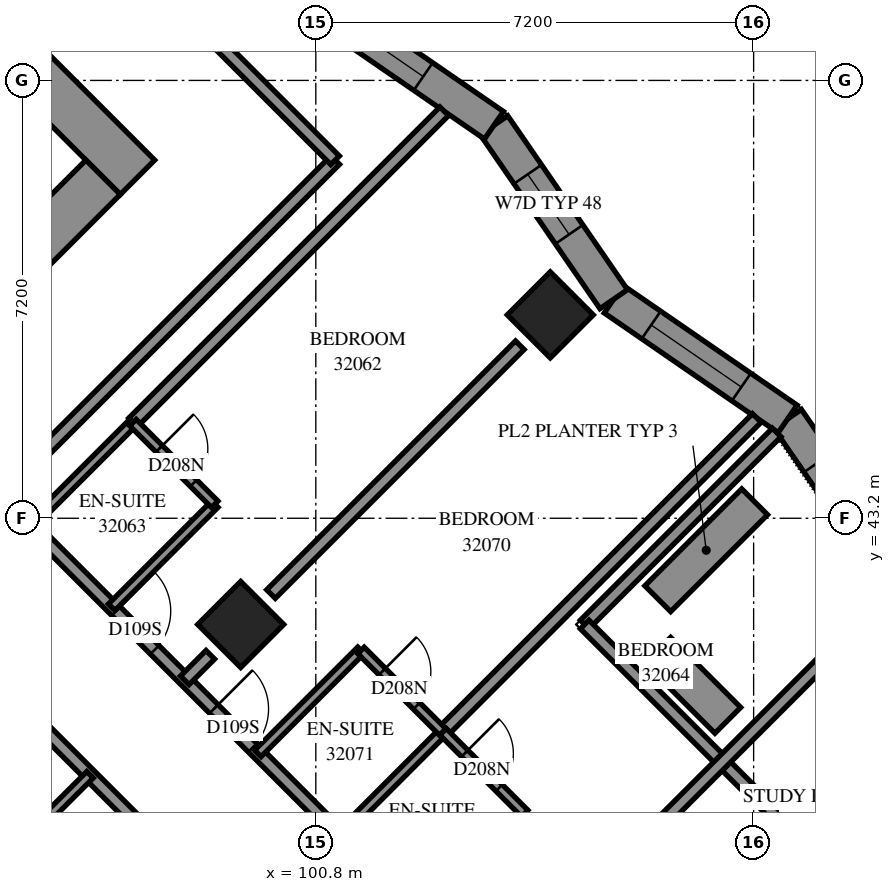
"""IFC4 building model, lengths in metres.
Left out: names, types, materials, properties, quantities, classifications, styles, units other than length and angle.
Written with IfcOpenShell. Run it as: python <this file> out.ifc"""

import sys

from ifc_helpers import new_model, si_unit, direction, frame, frame_2d, origin, origin_2d, place, context, subcontext, project, spatial, polyline, rectangle, outline, extrude, element, fill, save


model = new_model("IFC4")
c1 = context("Model", 3, precision=1e-05, world=origin(), true_north=direction((0.0, 1.0)))
c2 = subcontext(c1, "Body", "Model", "MODEL_VIEW")
j1 = project(units=[si_unit("LENGTHUNIT", "METRE"), si_unit("PLANEANGLEUNIT", "RADIAN")], contexts=[c1])
p1 = place(None, origin())
s1 = spatial("IfcSite", under=j1, at=p1, CompositionType="ELEMENT")
p2 = place(p1, origin())
s2 = spatial("IfcBuilding", under=s1, at=p2, CompositionType="ELEMENT")
p3 = place(p2, frame((0.0, 0.0, 118.6)))
s3 = spatial("IfcBuildingStorey", under=s2, at=p3, CompositionType="ELEMENT", Elevation=118.6)
for number, where, z_axis, x_axis in (
    (1, (104.656, 46.544, 0.0), (0.0, 0.0, 1.0), (0.707, -0.707, 0.0)),
    (2, (99.565, 41.453, 0.0), (0.0, 0.0, 1.0), (0.707, -0.707, 0.0)),
):
    element("IfcColumn", number, at=place(p3, frame(where, z_axis=z_axis, x_axis=x_axis)), inside=s3, PredefinedType="COLUMN", context=c2, shape_type="SweptSolid", body=[
        extrude(rectangle(XDim=1.0, YDim=1.0, at=origin_2d()), origin(), (0.0, 0.0, 1.0), 3.1),
    ])
p4 = place(p3, frame((86.554, 60.121, -0.3), z_axis=(0.0, 0.0, 1.0), x_axis=(0.7071067812, -0.7071067812, 0.0)))
e3 = element("IfcWall", 3, at=p4, inside=s3, PredefinedType="SHEAR", context=c2, shape_type="SweptSolid", body=[
    extrude(rectangle(XDim=16.0, YDim=0.8, at=frame_2d((8.0, 0.0))), origin(), (0.0, 0.0, 1.0), 2.7),
])
p5 = place(p4, frame((10.8, 0.0, 0.3)))
e4 = element("IfcOpeningElement", 4, at=p5, cuts=e3, PredefinedType="OPENING", context=c2, shape_type="SweptSolid", body=[
    extrude(rectangle(XDim=0.8, YDim=2.1, at=frame_2d((0.4, 1.05))), frame((0.0, 0.41, 0.0), z_axis=(0.0, -1.0, 0.0), x_axis=(1.0, 0.0, 0.0)), (0.0, 0.0, 1.0), 0.82),
])
p6 = place(p3, frame((87.12, 38.625, -0.3), z_axis=(0.0, 0.0, 1.0), x_axis=(0.7071067812, 0.7071067812, 0.0)))
e5 = element("IfcWall", 5, at=p6, inside=s3, PredefinedType="SHEAR", context=c2, shape_type="SweptSolid", body=[
    extrude(rectangle(XDim=14.4, YDim=0.8, at=frame_2d((7.2, 0.0))), origin(), (0.0, 0.0, 1.0), 2.7),
])
p7 = place(p6, frame((4.55, 0.0, 0.3)))
e6 = element("IfcOpeningElement", 6, at=p7, cuts=e5, PredefinedType="OPENING", context=c2, shape_type="SweptSolid", body=[
    extrude(rectangle(XDim=1.1, YDim=2.1, at=frame_2d((0.55, 1.05))), frame((0.0, 0.41, 0.0), z_axis=(0.0, -1.0, 0.0), x_axis=(1.0, 0.0, 0.0)), (0.0, 0.0, 1.0), 0.82),
])
p8 = place(p6, frame((11.35, 0.0, 0.3)))
e7 = element("IfcOpeningElement", 7, at=p8, cuts=e5, PredefinedType="OPENING", context=c2, shape_type="SweptSolid", body=[
    extrude(rectangle(XDim=1.1, YDim=2.1, at=frame_2d((0.55, 1.05))), frame((0.0, 0.41, 0.0), z_axis=(0.0, -1.0, 0.0), x_axis=(1.0, 0.0, 0.0)), (0.0, 0.0, 1.0), 0.82),
])
p9 = place(p3, frame((109.358, 36.362, 0.0), z_axis=(0.0, 0.0, 1.0), x_axis=(0.7071067812, 0.7071067812, 0.0)))
e8 = element("IfcWall", 8, at=p9, inside=s3, PredefinedType="SOLIDWALL", context=c2, shape_type="SweptSolid", body=[
    extrude(outline(polyline([(0.275, -0.275), (6.305, -0.275), (5.522, 0.275), (-0.275, 0.275), (0.275, -0.275)])), origin(), (0.0, 0.0, 1.0), 3.1),
])
p10 = place(p9, frame((1.137, 0.0, 0.7)))
e9 = element("IfcOpeningElement", 9, at=p10, cuts=e8, PredefinedType="OPENING", context=c2, shape_type="SweptSolid", body=[
    extrude(rectangle(XDim=1.8, YDim=1.8, at=frame_2d((0.9, 0.9))), frame((0.0, 0.285, 0.0), z_axis=(0.0, -1.0, 0.0), x_axis=(1.0, 0.0, 0.0)), (0.0, 0.0, 1.0), 0.57),
])
p11 = place(p3, frame((110.542, 41.953, 0.0), z_axis=(0.0, 0.0, 1.0), x_axis=(-0.5670991884, 0.8236495071, 0.0)))
e10 = element("IfcWall", 10, at=p11, inside=s3, PredefinedType="SOLIDWALL", context=c2, shape_type="SweptSolid", body=[
    extrude(outline(polyline([(0.074, -0.275), (3.547, -0.275), (3.446, 0.275), (-0.074, 0.275), (0.074, -0.275)])), origin(), (0.0, 0.0, 1.0), 3.1),
])
p12 = place(p11, frame((0.823, 0.0, 0.7)))
e11 = element("IfcOpeningElement", 11, at=p12, cuts=e10, PredefinedType="OPENING", context=c2, shape_type="SweptSolid", body=[
    extrude(rectangle(XDim=1.8, YDim=2.0, at=frame_2d((0.9, 1.0))), frame((0.0, 0.285, 0.0), z_axis=(0.0, -1.0, 0.0), x_axis=(1.0, 0.0, 0.0)), (0.0, 0.0, 1.0), 0.57),
])
p13 = place(p3, frame((108.559, 44.833, 0.0), z_axis=(0.0, 0.0, 1.0), x_axis=(-0.8236501806, 0.5670982102, 0.0)))
e12 = element("IfcWall", 12, at=p13, inside=s3, PredefinedType="SOLIDWALL", context=c2, shape_type="SweptSolid", body=[
    extrude(outline(polyline([(-0.051, -0.275), (3.422, -0.275), (3.523, 0.275), (0.051, 0.275), (-0.051, -0.275)])), origin(), (0.0, 0.0, 1.0), 3.1),
])
p14 = place(p13, frame((0.924, 0.0, 0.7)))
e13 = element("IfcOpeningElement", 13, at=p14, cuts=e12, PredefinedType="OPENING", context=c2, shape_type="SweptSolid", body=[
    extrude(rectangle(XDim=1.8, YDim=2.0, at=frame_2d((0.9, 1.0))), frame((0.0, 0.285, 0.0), z_axis=(0.0, -1.0, 0.0), x_axis=(1.0, 0.0, 0.0)), (0.0, 0.0, 1.0), 0.57),
])
p15 = place(p3, frame((105.699, 46.803, 0.0), z_axis=(0.0, 0.0, 1.0), x_axis=(-0.567104295, 0.8236459911, 0.0)))
e14 = element("IfcWall", 14, at=p15, inside=s3, PredefinedType="SOLIDWALL", context=c2, shape_type="SweptSolid", body=[
    extrude(outline(polyline([(0.051, -0.275), (3.523, -0.275), (3.422, 0.275), (-0.051, 0.275), (0.051, -0.275)])), origin(), (0.0, 0.0, 1.0), 3.1),
])
p16 = place(p15, frame((1.293, 0.0, 0.5)))
e15 = element("IfcOpeningElement", 15, at=p16, cuts=e14, PredefinedType="OPENING", context=c2, shape_type="SweptSolid", body=[
    extrude(rectangle(XDim=1.2, YDim=2.45, at=frame_2d((0.6, 1.225))), frame((0.0, 0.285, 0.0), z_axis=(0.0, -1.0, 0.0), x_axis=(1.0, 0.0, 0.0)), (0.0, 0.0, 1.0), 0.57),
])
p17 = place(p3, frame((103.73, 49.663, 0.0), z_axis=(0.0, 0.0, 1.0), x_axis=(-0.8236594414, 0.5670847596, 0.0)))
e16 = element("IfcWall", 16, at=p17, inside=s3, PredefinedType="SOLIDWALL", context=c2, shape_type="SweptSolid", body=[
    extrude(outline(polyline([(-0.051, -0.275), (3.422, -0.275), (3.523, 0.275), (0.051, 0.275), (-0.051, -0.275)])), origin(), (0.0, 0.0, 1.0), 3.1),
])
p18 = place(p17, frame((1.413, 0.0, 0.5)))
e17 = element("IfcOpeningElement", 17, at=p18, cuts=e16, PredefinedType="OPENING", context=c2, shape_type="SweptSolid", body=[
    extrude(rectangle(XDim=1.2, YDim=2.45, at=frame_2d((0.6, 1.225))), frame((0.0, 0.285, 0.0), z_axis=(0.0, -1.0, 0.0), x_axis=(1.0, 0.0, 0.0)), (0.0, 0.0, 1.0), 0.57),
])
p19 = place(p3, frame((108.379, 44.61, 0.0), z_axis=(0.0, 0.0, 1.0), x_axis=(-0.7071179789, -0.7070955833, 0.0)))
e18 = element("IfcWall", 18, at=p19, inside=s3, PredefinedType="PARAPET", context=c2, shape_type="SweptSolid", body=[
    extrude(outline(polyline([(0.0, -0.1), (4.565, -0.1), (4.365, 0.1), (0.0, 0.1), (0.0, -0.1)])), origin(), (0.0, 0.0, 1.0), 0.25),
])
p20 = place(p3, frame((105.222, 41.453, 0.0), z_axis=(0.0, 0.0, 1.0), x_axis=(0.7071067812, -0.7071067812, 0.0)))
e19 = element("IfcWall", 19, at=p20, inside=s3, PredefinedType="PARAPET", context=c2, shape_type="SweptSolid", body=[
    extrude(outline(polyline([(-0.1, -0.1), (4.59, -0.1), (4.718, 0.1), (0.1, 0.1), (-0.1, -0.1)])), origin(), (0.0, 0.0, 1.0), 0.25),
])
p21 = place(p3, frame((106.424, 41.029, 0.0), z_axis=(0.0, 0.0, 1.0), x_axis=(0.7071374776, -0.7070760835, 0.0)))
e20 = element("IfcWall", 20, at=p21, inside=s3, PredefinedType="SOLIDWALL", context=c2, shape_type="SweptSolid", body=[
    extrude(rectangle(XDim=1.629, YDim=0.6, at=frame_2d((0.814, 0.0))), origin(), (0.0, 0.0, 1.0), 0.65),
])
p22 = place(p3, frame((94.047, 42.015, 0.0), z_axis=(0.0, 0.0, 1.0), x_axis=(0.7071067812, -0.7071067812, 0.0)))
e21 = element("IfcWall", 21, at=p22, inside=s3, PredefinedType="PARTITIONING", context=c2, shape_type="SweptSolid", body=[
    extrude(rectangle(XDim=9.6, YDim=0.2, at=frame_2d((4.8, 0.0))), origin(), (0.0, 0.0, 1.0), 3.1),
])
p23 = place(p22, frame((1.099, 0.0, 0.0)))
e22 = element("IfcOpeningElement", 22, at=p23, cuts=e21, PredefinedType="OPENING", context=c2, shape_type="SweptSolid", body=[
    extrude(rectangle(XDim=0.9, YDim=2.1, at=frame_2d((0.45, 1.05))), frame((0.0, 0.11, 0.0), z_axis=(0.0, -1.0, 0.0), x_axis=(1.0, 0.0, 0.0)), (0.0, 0.0, 1.0), 0.22),
])
p24 = place(p22, frame((6.649, 0.0, 0.0)))
e23 = element("IfcOpeningElement", 23, at=p24, cuts=e21, PredefinedType="OPENING", context=c2, shape_type="SweptSolid", body=[
    extrude(rectangle(XDim=0.9, YDim=2.1, at=frame_2d((0.45, 1.05))), frame((0.0, 0.11, 0.0), z_axis=(0.0, -1.0, 0.0), x_axis=(1.0, 0.0, 0.0)), (0.0, 0.0, 1.0), 0.22),
])
p25 = place(p22, frame((8.3, 0.0, 0.0)))
e24 = element("IfcOpeningElement", 24, at=p25, cuts=e21, PredefinedType="OPENING", context=c2, shape_type="SweptSolid", body=[
    extrude(rectangle(XDim=0.9, YDim=2.1, at=frame_2d((0.45, 1.05))), frame((0.0, 0.11, 0.0), z_axis=(0.0, -1.0, 0.0), x_axis=(1.0, 0.0, 0.0)), (0.0, 0.0, 1.0), 0.22),
])
p26 = place(p3, frame((96.103, 43.083, 0.0), z_axis=(0.0, 0.0, 1.0), x_axis=(0.7071067812, -0.7071067812, 0.0)))
e25 = element("IfcWall", 25, at=p26, inside=s3, PredefinedType="PARTITIONING", context=c2, shape_type="SweptSolid", body=[
    extrude(rectangle(XDim=8.491, YDim=0.2, at=frame_2d((4.245, 0.0))), origin(), (0.0, 0.0, 1.0), 3.1),
])
p27 = place(p26, frame((1.995, 0.0, 0.0)))
e26 = element("IfcOpeningElement", 26, at=p27, cuts=e25, PredefinedType="OPENING", context=c2, shape_type="SweptSolid", body=[
    extrude(rectangle(XDim=0.9, YDim=2.1, at=frame_2d((0.45, 1.05))), frame((0.0, 0.11, 0.0), z_axis=(0.0, -1.0, 0.0), x_axis=(1.0, 0.0, 0.0)), (0.0, 0.0, 1.0), 0.22),
])
p28 = place(p26, frame((4.27, 0.0, 0.0)))
e27 = element("IfcOpeningElement", 27, at=p28, cuts=e25, PredefinedType="OPENING", context=c2, shape_type="SweptSolid", body=[
    extrude(rectangle(XDim=0.9, YDim=2.1, at=frame_2d((0.45, 1.05))), frame((0.0, 0.11, 0.0), z_axis=(0.0, -1.0, 0.0), x_axis=(1.0, 0.0, 0.0)), (0.0, 0.0, 1.0), 0.22),
])
p29 = place(p3, frame((95.606, 43.577, 0.0), z_axis=(0.0, 0.0, 1.0), x_axis=(0.7071067812, 0.7071067812, 0.0)))
e28 = element("IfcWall", 28, at=p29, inside=s3, PredefinedType="PARTITIONING", context=c2, shape_type="SweptSolid", body=[
    extrude(rectangle(XDim=7.798, YDim=0.2, at=frame_2d((3.899, 0.0))), origin(), (0.0, 0.0, 1.0), 3.1),
])
p30 = place(p3, frame((102.887, 39.687, 0.0), z_axis=(0.0, 0.0, 1.0), x_axis=(0.707250564, 0.7069629691, 0.0)))
e29 = element("IfcWall", 29, at=p30, inside=s3, PredefinedType="PARTITIONING", context=c2, shape_type="SweptSolid", body=[
    extrude(rectangle(XDim=7.302, YDim=0.2, at=frame_2d((3.651, 0.0))), origin(), (0.0, 0.0, 1.0), 3.1),
])
p31 = place(p3, frame((97.795, 44.777, 0.0), z_axis=(0.0, 0.0, 1.0), x_axis=(0.7071136921, 0.7070998702, 0.0)))
e30 = element("IfcWall", 30, at=p31, inside=s3, PredefinedType="PARTITIONING", context=c2, shape_type="SweptSolid", body=[
    extrude(rectangle(XDim=7.235, YDim=0.2, at=frame_2d((3.617, 0.0))), origin(), (0.0, 0.0, 1.0), 3.1),
])
for number, where, z_axis, x_axis in (
    (31, (105.155, 36.863, 0.0), (0.0, 0.0, 1.0), (0.707, 0.707, 0.0)),
    (32, (100.063, 41.953, 0.0), (0.0, 0.0, 1.0), (0.707, 0.707, 0.0)),
):
    element("IfcWall", number, at=place(p3, frame(where, z_axis=z_axis, x_axis=x_axis)), inside=s3, PredefinedType="PARTITIONING", context=c2, shape_type="SweptSolid", body=[
        extrude(rectangle(XDim=5.787, YDim=0.2, at=frame_2d((2.893, 0.0))), origin(), (0.0, 0.0, 1.0), 3.1),
    ])
p32 = place(p3, frame((94.047, 38.621, 0.0), z_axis=(0.0, 0.0, 1.0), x_axis=(0.7071067812, -0.7071067812, 0.0)))
e33 = element("IfcWall", 33, at=p32, inside=s3, PredefinedType="PARTITIONING", context=c2, shape_type="SweptSolid", body=[
    extrude(rectangle(XDim=3.799, YDim=0.15, at=frame_2d((1.899, 0.0))), origin(), (0.0, 0.0, 1.0), 3.1),
])
p33 = place(p32, frame((0.444, 0.0, 0.0)))
e34 = element("IfcOpeningElement", 34, at=p33, cuts=e33, PredefinedType="OPENING", context=c2, shape_type="SweptSolid", body=[
    extrude(rectangle(XDim=0.8, YDim=2.1, at=frame_2d((0.4, 1.05))), frame((0.0, 0.085, 0.0), z_axis=(0.0, -1.0, 0.0), x_axis=(1.0, 0.0, 0.0)), (0.0, 0.0, 1.0), 0.17),
])
p34 = place(p32, frame((2.551, 0.0, 0.0)))
e35 = element("IfcOpeningElement", 35, at=p34, cuts=e33, PredefinedType="OPENING", context=c2, shape_type="SweptSolid", body=[
    extrude(rectangle(XDim=0.8, YDim=2.1, at=frame_2d((0.4, 1.05))), frame((0.0, 0.085, 0.0), z_axis=(0.0, -1.0, 0.0), x_axis=(1.0, 0.0, 0.0)), (0.0, 0.0, 1.0), 0.17),
])
p35 = place(p3, frame((99.071, 51.133, 0.0), z_axis=(0.0, 0.0, 1.0), x_axis=(0.7071067812, -0.7071067812, 0.0)))
e36 = element("IfcWall", 36, at=p35, inside=s3, PredefinedType="PARTITIONING", context=c2, shape_type="SweptSolid", body=[
    extrude(rectangle(XDim=2.893, YDim=0.2, at=frame_2d((1.447, 0.0))), origin(), (0.0, 0.0, 1.0), 3.1),
])
p36 = place(p3, frame((102.533, 36.645, 0.0), z_axis=(0.0, 0.0, 1.0), x_axis=(0.7071067812, 0.7071067812, 0.0)))
e37 = element("IfcWall", 37, at=p36, inside=s3, PredefinedType="PARTITIONING", context=c2, shape_type="SweptSolid", body=[
    extrude(rectangle(XDim=2.401, YDim=0.15, at=frame_2d((1.201, 0.0))), origin(), (0.0, 0.0, 1.0), 3.1),
])
for number, where, z_axis, x_axis in (
    (38, (101.192, 37.988, 0.0), (0.0, 0.0, 1.0), (0.707, 0.708, 0.0)),
    (39, (95.389, 37.285, 0.0), (0.0, 0.0, 1.0), (0.708, 0.707, 0.0)),
):
    element("IfcWall", number, at=place(p3, frame(where, z_axis=z_axis, x_axis=x_axis)), inside=s3, PredefinedType="PARTITIONING", context=c2, shape_type="SweptSolid", body=[
        extrude(rectangle(XDim=2.4, YDim=0.15, at=frame_2d((1.2, 0.0))), origin(), (0.0, 0.0, 1.0), 3.1),
    ])
for number, where, z_axis, x_axis in (
    (40, (97.443, 41.737, 0.0), (0.0, 0.0, 1.0), (0.707, 0.707, 0.0)),
    (41, (96.099, 43.081, 0.0), (0.0, 0.0, 1.0), (0.707, 0.707, 0.0)),
    (42, (99.847, 39.333, 0.0), (0.0, 0.0, 1.0), (0.707, 0.707, 0.0)),
):
    element("IfcWall", number, at=place(p3, frame(where, z_axis=z_axis, x_axis=x_axis)), inside=s3, PredefinedType="PARTITIONING", context=c2, shape_type="SweptSolid", body=[
        extrude(rectangle(XDim=2.398, YDim=0.15, at=frame_2d((1.199, 0.0))), origin(), (0.0, 0.0, 1.0), 3.1),
    ])
p37 = place(p3, frame((97.793, 44.773, 0.0), z_axis=(0.0, 0.0, 1.0), x_axis=(0.7071067812, -0.7071067812, 0.0)))
e43 = element("IfcWall", 43, at=p37, inside=s3, PredefinedType="PARTITIONING", context=c2, shape_type="SweptSolid", body=[
    extrude(rectangle(XDim=1.901, YDim=0.15, at=frame_2d((0.95, 0.0))), origin(), (0.0, 0.0, 1.0), 3.1),
])
p38 = place(p37, frame((0.609, 0.0, 0.0)))
e44 = element("IfcOpeningElement", 44, at=p38, cuts=e43, PredefinedType="OPENING", context=c2, shape_type="SweptSolid", body=[
    extrude(rectangle(XDim=0.8, YDim=2.1, at=frame_2d((0.4, 1.05))), frame((0.0, 0.085, 0.0), z_axis=(0.0, -1.0, 0.0), x_axis=(1.0, 0.0, 0.0)), (0.0, 0.0, 1.0), 0.17),
])
p39 = place(p3, frame((102.891, 39.69, 0.0), z_axis=(0.0, 0.0, 1.0), x_axis=(0.7071067812, -0.7071067812, 0.0)))
e45 = element("IfcWall", 45, at=p39, inside=s3, PredefinedType="PARTITIONING", context=c2, shape_type="SweptSolid", body=[
    extrude(rectangle(XDim=1.901, YDim=0.15, at=frame_2d((0.95, 0.0))), origin(), (0.0, 0.0, 1.0), 3.1),
])
p40 = place(p39, frame((0.505, 0.0, 0.0)))
e46 = element("IfcOpeningElement", 46, at=p40, cuts=e45, PredefinedType="OPENING", context=c2, shape_type="SweptSolid", body=[
    extrude(rectangle(XDim=0.8, YDim=2.1, at=frame_2d((0.4, 1.05))), frame((0.0, 0.085, 0.0), z_axis=(0.0, -1.0, 0.0), x_axis=(1.0, 0.0, 0.0)), (0.0, 0.0, 1.0), 0.17),
])
p41 = place(p3, frame((101.543, 41.027, 0.0), z_axis=(0.0, 0.0, 1.0), x_axis=(0.7076330979, -0.7065800724, 0.0)))
e47 = element("IfcWall", 47, at=p41, inside=s3, PredefinedType="PARTITIONING", context=c2, shape_type="SweptSolid", body=[
    extrude(rectangle(XDim=1.899, YDim=0.15, at=frame_2d((0.95, 0.0))), origin(), (0.0, 0.0, 1.0), 3.1),
])
p42 = place(p41, frame((0.493, 0.0, 0.0)))
e48 = element("IfcOpeningElement", 48, at=p42, cuts=e47, PredefinedType="OPENING", context=c2, shape_type="SweptSolid", body=[
    extrude(rectangle(XDim=0.8, YDim=2.1, at=frame_2d((0.4, 1.05))), frame((0.0, 0.085, 0.0), z_axis=(0.0, -1.0, 0.0), x_axis=(1.0, 0.0, 0.0)), (0.0, 0.0, 1.0), 0.17),
])
p43 = place(p3, frame((98.645, 40.535, 0.0), z_axis=(0.0, 0.0, 1.0), x_axis=(0.7071067812, 0.7071067812, 0.0)))
e49 = element("IfcWall", 49, at=p43, inside=s3, PredefinedType="PARTITIONING", context=c2, shape_type="SweptSolid", body=[
    extrude(rectangle(XDim=0.594, YDim=0.2, at=frame_2d((0.297, 0.0))), origin(), (0.0, 0.0, 1.0), 3.1),
])
p44 = place(p3, frame((108.017, 43.47, 0.0), z_axis=(0.0, 0.0, 1.0), x_axis=(-0.7071289757, -0.707084586, 0.0)))
e50 = element("IfcWall", 50, at=p44, inside=s3, PredefinedType="SOLIDWALL", context=c2, shape_type="SweptSolid", body=[
    extrude(outline(polyline([(0.0, -0.3), (2.253, -0.3), (2.253, 0.3), (0.0, 0.3), (0.0, -0.3)])), origin(), (0.0, 0.0, 1.0), 0.65),
])
p45 = place(p12, origin())
e51 = element("IfcWindow", 51, at=p45, inside=s3, PartitioningType="SINGLE_PANEL", PredefinedType="WINDOW", context=c2, shape_type="SweptSolid", body=[
    extrude(rectangle(XDim=1.8, YDim=2.0, at=frame_2d((0.9, 1.0))), frame((0.0, 0.155, 0.0), z_axis=(0.0, -1.0, 0.0), x_axis=(1.0, 0.0, 0.0)), (0.0, 0.0, 1.0), 0.06),
])
fill(e11, e51)
p46 = place(p14, origin())
e52 = element("IfcWindow", 52, at=p46, inside=s3, PartitioningType="SINGLE_PANEL", PredefinedType="WINDOW", context=c2, shape_type="SweptSolid", body=[
    extrude(rectangle(XDim=1.8, YDim=2.0, at=frame_2d((0.9, 1.0))), frame((0.0, 0.155, 0.0), z_axis=(0.0, -1.0, 0.0), x_axis=(1.0, 0.0, 0.0)), (0.0, 0.0, 1.0), 0.06),
])
fill(e13, e52)
p47 = place(p16, origin())
e53 = element("IfcWindow", 53, at=p47, inside=s3, PartitioningType="SINGLE_PANEL", PredefinedType="WINDOW", context=c2, shape_type="SweptSolid", body=[
    extrude(rectangle(XDim=1.2, YDim=2.45, at=frame_2d((0.6, 1.225))), frame((0.0, 0.155, 0.0), z_axis=(0.0, -1.0, 0.0), x_axis=(1.0, 0.0, 0.0)), (0.0, 0.0, 1.0), 0.06),
])
fill(e15, e53)
p48 = place(p18, origin())
e54 = element("IfcWindow", 54, at=p48, inside=s3, PartitioningType="SINGLE_PANEL", PredefinedType="WINDOW", context=c2, shape_type="SweptSolid", body=[
    extrude(rectangle(XDim=1.2, YDim=2.45, at=frame_2d((0.6, 1.225))), frame((0.0, 0.155, 0.0), z_axis=(0.0, -1.0, 0.0), x_axis=(1.0, 0.0, 0.0)), (0.0, 0.0, 1.0), 0.06),
])
fill(e17, e54)
p49 = place(p27, origin())
e55 = element("IfcDoor", 55, at=p49, inside=s3, OperationType="SINGLE_SWING_RIGHT", PredefinedType="DOOR", context=c2, shape_type="SweptSolid", body=[
    extrude(rectangle(XDim=0.9, YDim=2.1, at=frame_2d((0.45, 1.05))), frame((0.0, 0.025, 0.0), z_axis=(0.0, -1.0, 0.0), x_axis=(1.0, 0.0, 0.0)), (0.0, 0.0, 1.0), 0.05),
])
fill(e26, e55)
p50 = place(p38, origin())
e56 = element("IfcDoor", 56, at=p50, inside=s3, OperationType="SINGLE_SWING_RIGHT", PredefinedType="DOOR", context=c2, shape_type="SweptSolid", body=[
    extrude(rectangle(XDim=0.8, YDim=2.1, at=frame_2d((0.4, 1.05))), frame((0.0, 0.025, 0.0), z_axis=(0.0, -1.0, 0.0), x_axis=(1.0, 0.0, 0.0)), (0.0, 0.0, 1.0), 0.05),
])
fill(e44, e56)
p51 = place(p40, origin())
e57 = element("IfcDoor", 57, at=p51, inside=s3, OperationType="SINGLE_SWING_RIGHT", PredefinedType="DOOR", context=c2, shape_type="SweptSolid", body=[
    extrude(rectangle(XDim=0.8, YDim=2.1, at=frame_2d((0.4, 1.05))), frame((0.0, 0.025, 0.0), z_axis=(0.0, -1.0, 0.0), x_axis=(1.0, 0.0, 0.0)), (0.0, 0.0, 1.0), 0.05),
])
fill(e46, e57)
p52 = place(p28, origin())
e58 = element("IfcDoor", 58, at=p52, inside=s3, OperationType="SINGLE_SWING_LEFT", PredefinedType="DOOR", context=c2, shape_type="SweptSolid", body=[
    extrude(rectangle(XDim=0.9, YDim=2.1, at=frame_2d((0.45, 1.05))), frame((0.0, 0.025, 0.0), z_axis=(0.0, -1.0, 0.0), x_axis=(1.0, 0.0, 0.0)), (0.0, 0.0, 1.0), 0.05),
])
fill(e27, e58)
p53 = place(p42, origin())
e59 = element("IfcDoor", 59, at=p53, inside=s3, OperationType="SINGLE_SWING_RIGHT", PredefinedType="DOOR", context=c2, shape_type="SweptSolid", body=[
    extrude(rectangle(XDim=0.8, YDim=2.1, at=frame_2d((0.4, 1.05))), frame((0.0, 0.025, 0.0), z_axis=(0.0, -1.0, 0.0), x_axis=(1.0, 0.0, 0.0)), (0.0, 0.0, 1.0), 0.05),
])
fill(e48, e59)
save(model, sys.argv[1])
